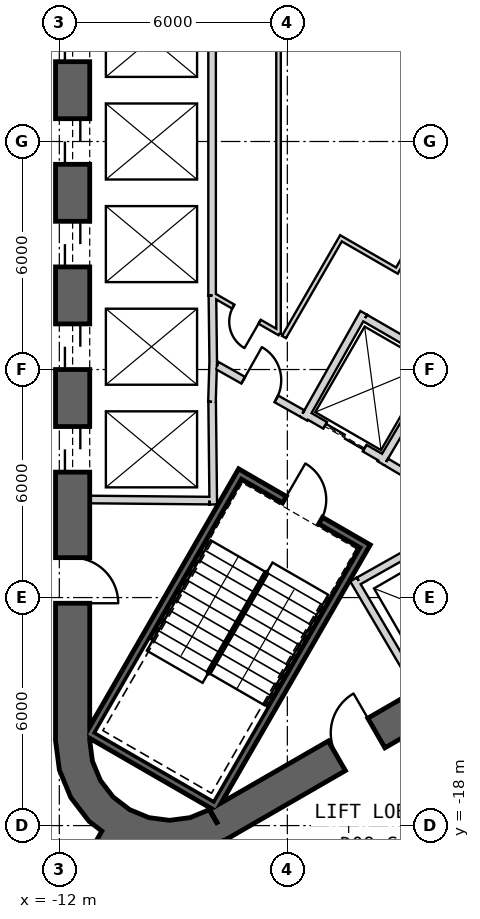
"""IFC4 building model, lengths in metres.
Left out: names, types, materials, properties, quantities, classifications, styles, units other than length and angle.
Written with IfcOpenShell. Run it as: python <this file> out.ifc"""

import sys

from ifc_helpers import new_model, si_unit, direction, frame, frame_2d, origin, place, context, subcontext, project, spatial, polyline, rectangle, outline, extrude, element, fill, save


model = new_model("IFC4")
c1 = context("Model", 3, precision=1e-05, world=origin(), true_north=direction((0.0, 1.0)))
c2 = subcontext(c1, "Body", "Model", "MODEL_VIEW")
j1 = project(units=[si_unit("LENGTHUNIT", "METRE"), si_unit("PLANEANGLEUNIT", "RADIAN")], contexts=[c1])
p1 = place(None, origin())
s1 = spatial("IfcSite", under=j1, at=p1, CompositionType="ELEMENT")
p2 = place(p1, origin())
s2 = spatial("IfcBuilding", under=s1, at=p2, CompositionType="ELEMENT")
p3 = place(p2, frame((0.0, 0.0, 181.2)))
s3 = spatial("IfcBuildingStorey", under=s2, at=p3, CompositionType="ELEMENT", Elevation=181.2)
p4 = place(p3, frame((19.475, 2.208, 0.0), z_axis=(0.0, 0.0, 1.0), x_axis=(-0.866028369851, 0.499994862586, 0.0)))
e1 = element("IfcWall", 1, at=p4, inside=s3, PredefinedType="SHEAR", context=c2, shape_type="SweptSolid", body=[
    extrude(rectangle(XDim=31.523, YDim=0.9, at=frame_2d((15.762, 0.0))), origin(), (0.0, 0.0, 1.0), 4.0),
])
p5 = place(p4, frame((7.062, 0.0, 0.0)))
e2 = element("IfcOpeningElement", 2, at=p5, cuts=e1, PredefinedType="OPENING", context=c2, shape_type="SweptSolid", body=[
    extrude(rectangle(XDim=1.2, YDim=2.4, at=frame_2d((0.6, 1.2))), frame((0.0, 0.46, 0.0), z_axis=(0.0, -1.0, 0.0), x_axis=(1.0, 0.0, 0.0)), (0.0, 0.0, 1.0), 0.92),
])
p6 = place(p4, frame((3.612, 0.0, 0.0)))
e3 = element("IfcOpeningElement", 3, at=p6, cuts=e1, PredefinedType="OPENING", context=c2, shape_type="SweptSolid", body=[
    extrude(rectangle(XDim=1.2, YDim=2.4, at=frame_2d((0.6, 1.2))), frame((0.0, 0.46, 0.0), z_axis=(0.0, -1.0, 0.0), x_axis=(1.0, 0.0, 0.0)), (0.0, 0.0, 1.0), 0.92),
])
p7 = place(p4, frame((26.712, 0.0, 0.0)))
e4 = element("IfcOpeningElement", 4, at=p7, cuts=e1, PredefinedType="OPENING", context=c2, shape_type="SweptSolid", body=[
    extrude(rectangle(XDim=1.2, YDim=2.4, at=frame_2d((0.6, 1.2))), frame((0.0, 0.46, 0.0), z_axis=(0.0, -1.0, 0.0), x_axis=(1.0, 0.0, 0.0)), (0.0, 0.0, 1.0), 0.92),
])
p8 = place(p3, frame((-11.65, 15.762, 0.0), z_axis=(0.0, 0.0, 1.0), x_axis=(0.0, -1.0, 0.0)))
e5 = element("IfcWall", 5, at=p8, inside=s3, PredefinedType="SHEAR", context=c2, shape_type="SweptSolid", body=[
    extrude(rectangle(XDim=31.523, YDim=0.9, at=frame_2d((15.762, 0.0))), origin(), (0.0, 0.0, 1.0), 4.0),
])
p9 = place(p8, frame((7.062, 0.0, 0.0)))
e6 = element("IfcOpeningElement", 6, at=p9, cuts=e5, PredefinedType="OPENING", context=c2, shape_type="SweptSolid", body=[
    extrude(rectangle(XDim=1.2, YDim=2.4, at=frame_2d((0.6, 1.2))), frame((0.0, 0.46, 0.0), z_axis=(0.0, -1.0, 0.0), x_axis=(1.0, 0.0, 0.0)), (0.0, 0.0, 1.0), 0.92),
])
p10 = place(p8, frame((9.762, 0.0, 0.0)))
e7 = element("IfcOpeningElement", 7, at=p10, cuts=e5, PredefinedType="OPENING", context=c2, shape_type="SweptSolid", body=[
    extrude(rectangle(XDim=1.2, YDim=2.4, at=frame_2d((0.6, 1.2))), frame((0.0, 0.46, 0.0), z_axis=(0.0, -1.0, 0.0), x_axis=(1.0, 0.0, 0.0)), (0.0, 0.0, 1.0), 0.92),
])
p11 = place(p8, frame((12.462, 0.0, 0.0)))
e8 = element("IfcOpeningElement", 8, at=p11, cuts=e5, PredefinedType="OPENING", context=c2, shape_type="SweptSolid", body=[
    extrude(rectangle(XDim=1.2, YDim=2.4, at=frame_2d((0.6, 1.2))), frame((0.0, 0.46, 0.0), z_axis=(0.0, -1.0, 0.0), x_axis=(1.0, 0.0, 0.0)), (0.0, 0.0, 1.0), 0.92),
])
p12 = place(p8, frame((15.162, 0.0, 0.0)))
e9 = element("IfcOpeningElement", 9, at=p12, cuts=e5, PredefinedType="OPENING", context=c2, shape_type="SweptSolid", body=[
    extrude(rectangle(XDim=1.2, YDim=2.4, at=frame_2d((0.6, 1.2))), frame((0.0, 0.46, 0.0), z_axis=(0.0, -1.0, 0.0), x_axis=(1.0, 0.0, 0.0)), (0.0, 0.0, 1.0), 0.92),
])
p13 = place(p8, frame((17.862, 0.0, 0.0)))
e10 = element("IfcOpeningElement", 10, at=p13, cuts=e5, PredefinedType="OPENING", context=c2, shape_type="SweptSolid", body=[
    extrude(rectangle(XDim=1.2, YDim=2.4, at=frame_2d((0.6, 1.2))), frame((0.0, 0.46, 0.0), z_axis=(0.0, -1.0, 0.0), x_axis=(1.0, 0.0, 0.0)), (0.0, 0.0, 1.0), 0.92),
])
p14 = place(p8, frame((20.562, 0.0, 0.0)))
e11 = element("IfcOpeningElement", 11, at=p14, cuts=e5, PredefinedType="OPENING", context=c2, shape_type="SweptSolid", body=[
    extrude(rectangle(XDim=1.2, YDim=2.4, at=frame_2d((0.6, 1.2))), frame((0.0, 0.46, 0.0), z_axis=(0.0, -1.0, 0.0), x_axis=(1.0, 0.0, 0.0)), (0.0, 0.0, 1.0), 0.92),
])
p15 = place(p8, frame((23.262, 0.0, 0.0)))
e12 = element("IfcOpeningElement", 12, at=p15, cuts=e5, PredefinedType="OPENING", context=c2, shape_type="SweptSolid", body=[
    extrude(rectangle(XDim=1.2, YDim=2.4, at=frame_2d((0.6, 1.2))), frame((0.0, 0.46, 0.0), z_axis=(0.0, -1.0, 0.0), x_axis=(1.0, 0.0, 0.0)), (0.0, 0.0, 1.0), 0.92),
])
p16 = place(p8, frame((3.612, 0.0, 0.0)))
e13 = element("IfcOpeningElement", 13, at=p16, cuts=e5, PredefinedType="OPENING", context=c2, shape_type="SweptSolid", body=[
    extrude(rectangle(XDim=1.2, YDim=2.4, at=frame_2d((0.6, 1.2))), frame((0.0, 0.46, 0.0), z_axis=(0.0, -1.0, 0.0), x_axis=(1.0, 0.0, 0.0)), (0.0, 0.0, 1.0), 0.92),
])
p17 = place(p8, frame((26.712, 0.0, 0.0)))
e14 = element("IfcOpeningElement", 14, at=p17, cuts=e5, PredefinedType="OPENING", context=c2, shape_type="SweptSolid", body=[
    extrude(rectangle(XDim=1.2, YDim=2.4, at=frame_2d((0.6, 1.2))), frame((0.0, 0.46, 0.0), z_axis=(0.0, -1.0, 0.0), x_axis=(1.0, 0.0, 0.0)), (0.0, 0.0, 1.0), 0.92),
])
p18 = place(p3, frame((-7.825, -17.97, 0.0), z_axis=(0.0, 0.0, 1.0), x_axis=(0.866028369851, 0.499994862586, 0.0)))
e15 = element("IfcWall", 15, at=p18, inside=s3, PredefinedType="SHEAR", context=c2, shape_type="SweptSolid", body=[
    extrude(rectangle(XDim=31.523, YDim=0.9, at=frame_2d((15.762, 0.0))), origin(), (0.0, 0.0, 1.0), 4.0),
])
p19 = place(p18, frame((7.062, 0.0, 0.0)))
e16 = element("IfcOpeningElement", 16, at=p19, cuts=e15, PredefinedType="OPENING", context=c2, shape_type="SweptSolid", body=[
    extrude(rectangle(XDim=1.2, YDim=2.4, at=frame_2d((0.6, 1.2))), frame((0.0, 0.46, 0.0), z_axis=(0.0, -1.0, 0.0), x_axis=(1.0, 0.0, 0.0)), (0.0, 0.0, 1.0), 0.92),
])
p20 = place(p18, frame((9.762, 0.0, 0.0)))
e17 = element("IfcOpeningElement", 17, at=p20, cuts=e15, PredefinedType="OPENING", context=c2, shape_type="SweptSolid", body=[
    extrude(rectangle(XDim=1.2, YDim=2.4, at=frame_2d((0.6, 1.2))), frame((0.0, 0.46, 0.0), z_axis=(0.0, -1.0, 0.0), x_axis=(1.0, 0.0, 0.0)), (0.0, 0.0, 1.0), 0.92),
])
p21 = place(p18, frame((12.462, 0.0, 0.0)))
e18 = element("IfcOpeningElement", 18, at=p21, cuts=e15, PredefinedType="OPENING", context=c2, shape_type="SweptSolid", body=[
    extrude(rectangle(XDim=1.2, YDim=2.4, at=frame_2d((0.6, 1.2))), frame((0.0, 0.46, 0.0), z_axis=(0.0, -1.0, 0.0), x_axis=(1.0, 0.0, 0.0)), (0.0, 0.0, 1.0), 0.92),
])
p22 = place(p18, frame((15.162, 0.0, 0.0)))
e19 = element("IfcOpeningElement", 19, at=p22, cuts=e15, PredefinedType="OPENING", context=c2, shape_type="SweptSolid", body=[
    extrude(rectangle(XDim=1.2, YDim=2.4, at=frame_2d((0.6, 1.2))), frame((0.0, 0.46, 0.0), z_axis=(0.0, -1.0, 0.0), x_axis=(1.0, 0.0, 0.0)), (0.0, 0.0, 1.0), 0.92),
])
p23 = place(p18, frame((17.862, 0.0, 0.0)))
e20 = element("IfcOpeningElement", 20, at=p23, cuts=e15, PredefinedType="OPENING", context=c2, shape_type="SweptSolid", body=[
    extrude(rectangle(XDim=1.2, YDim=2.4, at=frame_2d((0.6, 1.2))), frame((0.0, 0.46, 0.0), z_axis=(0.0, -1.0, 0.0), x_axis=(1.0, 0.0, 0.0)), (0.0, 0.0, 1.0), 0.92),
])
p24 = place(p18, frame((20.562, 0.0, 0.0)))
e21 = element("IfcOpeningElement", 21, at=p24, cuts=e15, PredefinedType="OPENING", context=c2, shape_type="SweptSolid", body=[
    extrude(rectangle(XDim=1.2, YDim=2.4, at=frame_2d((0.6, 1.2))), frame((0.0, 0.46, 0.0), z_axis=(0.0, -1.0, 0.0), x_axis=(1.0, 0.0, 0.0)), (0.0, 0.0, 1.0), 0.92),
])
p25 = place(p18, frame((26.712, 0.0, 0.0)))
e22 = element("IfcOpeningElement", 22, at=p25, cuts=e15, PredefinedType="OPENING", context=c2, shape_type="SweptSolid", body=[
    extrude(rectangle(XDim=1.2, YDim=2.4, at=frame_2d((0.6, 1.2))), frame((0.0, 0.46, 0.0), z_axis=(0.0, -1.0, 0.0), x_axis=(1.0, 0.0, 0.0)), (0.0, 0.0, 1.0), 0.92),
])
p26 = place(p18, frame((3.612, 0.0, 0.0)))
e23 = element("IfcOpeningElement", 23, at=p26, cuts=e15, PredefinedType="OPENING", context=c2, shape_type="SweptSolid", body=[
    extrude(rectangle(XDim=1.2, YDim=2.4, at=frame_2d((0.6, 1.2))), frame((0.0, 0.46, 0.0), z_axis=(0.0, -1.0, 0.0), x_axis=(1.0, 0.0, 0.0)), (0.0, 0.0, 1.0), 0.92),
])
p27 = place(p3, origin())
e24 = element("IfcWall", 24, at=p27, inside=s3, PredefinedType="SHEAR", context=c2, shape_type="SweptSolid", body=[
    extrude(outline(polyline([(-12.1, -15.762), (-11.998, -16.538), (-11.698, -17.262), (-11.221, -17.883), (-10.6, -18.36), (-9.876, -18.659), (-9.1, -18.762), (-8.323, -18.659), (-7.6, -18.36), (-8.05, -17.58), (-8.556, -17.79), (-9.1, -17.862), (-9.644, -17.79), (-10.15, -17.58), (-10.585, -17.247), (-10.919, -16.812), (-11.128, -16.305), (-11.2, -15.762), (-12.1, -15.762)])), origin(), (0.0, 0.0, 1.0), 4.0),
])
p28 = place(p3, frame((-10.575, -18.316, 0.0), z_axis=(0.0, 0.0, 1.0), x_axis=(-0.500002625756, -0.866023887798, 0.0)))
e25 = element("IfcWall", 25, at=p28, inside=s3, PredefinedType="SHEAR", context=c2, shape_type="SweptSolid", body=[
    extrude(rectangle(XDim=12.22, YDim=0.7, at=frame_2d((6.11, 0.0))), origin(), (0.0, 0.0, 1.0), 4.0),
])
p29 = place(p3, frame((-7.98, 4.05, 0.0), z_axis=(0.0, 0.0, 1.0), x_axis=(0.0, -1.0, 0.0)))
e26 = element("IfcWall", 26, at=p29, inside=s3, PredefinedType="PLUMBINGWALL", context=c2, shape_type="SweptSolid", body=[
    extrude(rectangle(XDim=8.1, YDim=0.2, at=frame_2d((4.05, 0.0))), origin(), (0.0, 0.0, 1.0), 3.7),
])
p30 = place(p3, frame((-7.95, -5.772, 0.0), z_axis=(0.0, 0.0, 1.0), x_axis=(-0.030803413295, -0.999525462272, 0.0)))
e27 = element("IfcWall", 27, at=p30, inside=s3, PredefinedType="PLUMBINGWALL", context=c2, shape_type="SweptSolid", body=[
    extrude(rectangle(XDim=1.078, YDim=0.2, at=frame_2d((0.539, 0.0))), origin(), (0.0, 0.0, 1.0), 3.7),
])
p31 = place(p3, frame((-7.971, -4.05, 0.0), z_axis=(0.0, 0.0, 1.0), x_axis=(0.012042535896, -0.999927486035, 0.0)))
e28 = element("IfcWall", 28, at=p31, inside=s3, PredefinedType="PLUMBINGWALL", context=c2, shape_type="SweptSolid", body=[
    extrude(rectangle(XDim=1.845, YDim=0.2, at=frame_2d((0.922, 0.0))), origin(), (0.0, 0.0, 1.0), 3.7),
])
p32 = place(p3, frame((-7.979, -6.85, 0.0), z_axis=(0.0, 0.0, 1.0), x_axis=(0.011121475088, -0.999938154483, 0.0)))
e29 = element("IfcWall", 29, at=p32, inside=s3, PredefinedType="PLUMBINGWALL", context=c2, shape_type="SweptSolid", body=[
    extrude(rectangle(XDim=2.7, YDim=0.2, at=frame_2d((1.35, 0.0))), origin(), (0.0, 0.0, 1.0), 3.7),
])
p33 = place(p3, frame((-8.05, -9.449, 0.0), z_axis=(0.0, 0.0, 1.0), x_axis=(-0.999957467379, 0.009222983926, 0.0)))
e30 = element("IfcWall", 30, at=p33, inside=s3, PredefinedType="PLUMBINGWALL", context=c2, shape_type="SweptSolid", body=[
    extrude(rectangle(XDim=3.15, YDim=0.2, at=frame_2d((1.575, 0.0))), origin(), (0.0, 0.0, 1.0), 3.7),
])
p34 = place(p3, frame((-2.558, -14.409, 0.0), z_axis=(0.0, 0.0, 1.0), x_axis=(-0.507997497166, 0.861358544901, 0.0)))
e31 = element("IfcWall", 31, at=p34, inside=s3, PredefinedType="PLUMBINGWALL", context=c2, shape_type="SweptSolid", body=[
    extrude(rectangle(XDim=3.35, YDim=0.2, at=frame_2d((1.675, 0.0))), origin(), (0.0, 0.0, 1.0), 3.7),
])
p35 = place(p3, frame((-1.769, -10.237, 0.0), z_axis=(0.0, 0.0, 1.0), x_axis=(-0.871534483978, -0.490334215854, 0.0)))
e32 = element("IfcWall", 32, at=p35, inside=s3, PredefinedType="PLUMBINGWALL", context=c2, shape_type="SweptSolid", body=[
    extrude(rectangle(XDim=2.7, YDim=0.2, at=frame_2d((1.35, 0.0))), origin(), (0.0, 0.0, 1.0), 3.7),
])
p36 = place(p3, frame((-3.905, -10.563, -0.3), z_axis=(0.0, 0.0, 1.0), x_axis=(-0.500012932018, -0.866017937352, 0.0)))
e33 = element("IfcWall", 33, at=p36, inside=s3, PredefinedType="SHEAR", context=c2, shape_type="SweptSolid", body=[
    extrude(rectangle(XDim=8.1, YDim=0.2, at=frame_2d((4.05, 0.0))), origin(), (0.0, 0.0, 1.0), 4.0),
])
p37 = place(p3, frame((-11.282, -15.541, -0.3), z_axis=(0.0, 0.0, 1.0), x_axis=(0.866000483506, -0.500043160704, 0.0)))
e34 = element("IfcWall", 34, at=p37, inside=s3, PredefinedType="SHEAR", context=c2, shape_type="SweptSolid", body=[
    extrude(rectangle(XDim=3.8, YDim=0.2, at=frame_2d((1.9, 0.0))), origin(), (0.0, 0.0, 1.0), 4.0),
])
p38 = place(p3, frame((-7.196, -8.663, -0.3), z_axis=(0.0, 0.0, 1.0), x_axis=(-0.499997992926, -0.866026562566, 0.0)))
e35 = element("IfcWall", 35, at=p38, inside=s3, PredefinedType="SHEAR", context=c2, shape_type="SweptSolid", body=[
    extrude(rectangle(XDim=7.9, YDim=0.2, at=frame_2d((3.95, 0.0))), origin(), (0.0, 0.0, 1.0), 4.0),
])
p39 = place(p3, frame((-4.041, -10.599, -0.3), z_axis=(0.0, 0.0, 1.0), x_axis=(-0.866047807691, 0.499961193289, 0.0)))
e36 = element("IfcWall", 36, at=p39, inside=s3, PredefinedType="SHEAR", context=c2, shape_type="SweptSolid", body=[
    extrude(rectangle(XDim=3.6, YDim=0.2, at=frame_2d((1.8, 0.0))), origin(), (0.0, 0.0, 1.0), 4.0),
])
p40 = place(p39, frame((1.25, 0.0, 0.3)))
e37 = element("IfcOpeningElement", 37, at=p40, cuts=e36, PredefinedType="OPENING", context=c2, shape_type="SweptSolid", body=[
    extrude(rectangle(XDim=1.1, YDim=2.1, at=frame_2d((0.55, 1.05))), frame((0.0, 0.11, 0.0), z_axis=(0.0, -1.0, 0.0), x_axis=(1.0, 0.0, 0.0)), (0.0, 0.0, 1.0), 0.22),
])
p41 = place(p3, frame((-3.446, -8.368, 0.0), z_axis=(0.0, 0.0, 1.0), x_axis=(-0.866024647952, 0.500001309137, 0.0)))
e38 = element("IfcWall", 38, at=p41, inside=s3, PredefinedType="PLUMBINGWALL", context=c2, shape_type="SweptSolid", body=[
    extrude(rectangle(XDim=2.4, YDim=0.2, at=frame_2d((1.2, 0.0))), origin(), (0.0, 0.0, 1.0), 3.7),
])
p42 = place(p41, frame((0.6, 0.0, 0.0)))
e39 = element("IfcOpeningElement", 39, at=p42, cuts=e38, PredefinedType="OPENING", context=c2, shape_type="SweptSolid", body=[
    extrude(rectangle(XDim=1.2, YDim=2.4, at=frame_2d((0.6, 1.2))), frame((0.0, 0.11, 0.0), z_axis=(0.0, -1.0, 0.0), x_axis=(1.0, 0.0, 0.0)), (0.0, 0.0, 1.0), 0.22),
])
p43 = place(p3, frame((-1.961, -5.796, 0.0), z_axis=(0.0, 0.0, 1.0), x_axis=(-0.508647062354, -0.860975125052, 0.0)))
e40 = element("IfcWall", 40, at=p43, inside=s3, PredefinedType="PLUMBINGWALL", context=c2, shape_type="SweptSolid", body=[
    extrude(rectangle(XDim=3.1, YDim=0.2, at=frame_2d((1.55, 0.0))), origin(), (0.0, 0.0, 1.0), 3.7),
])
p44 = place(p3, frame((-3.99, -4.509, 0.0), z_axis=(0.0, 0.0, 1.0), x_axis=(-0.491358283181, -0.870957540612, 0.0)))
e41 = element("IfcWall", 41, at=p44, inside=s3, PredefinedType="PLUMBINGWALL", context=c2, shape_type="SweptSolid", body=[
    extrude(rectangle(XDim=3.2, YDim=0.2, at=frame_2d((1.6, 0.0))), origin(), (0.0, 0.0, 1.0), 3.7),
])
p45 = place(p3, frame((-3.953, -4.646, 0.0), z_axis=(0.0, 0.0, 1.0), x_axis=(0.866038900241, -0.499976622722, 0.0)))
e42 = element("IfcWall", 42, at=p45, inside=s3, PredefinedType="PLUMBINGWALL", context=c2, shape_type="SweptSolid", body=[
    extrude(rectangle(XDim=2.189, YDim=0.2, at=frame_2d((1.095, 0.0))), origin(), (0.0, 0.0, 1.0), 3.7),
])
p46 = place(p3, frame((-3.401, -8.43, 0.0), z_axis=(0.0, 0.0, 1.0), x_axis=(0.860615607571, -0.509255118781, 0.0)))
e43 = element("IfcWall", 43, at=p46, inside=s3, PredefinedType="PARTITIONING", context=c2, shape_type="SweptSolid", body=[
    extrude(rectangle(XDim=2.581, YDim=0.2, at=frame_2d((1.29, 0.0))), origin(), (0.0, 0.0, 1.0), 3.7),
])
p47 = place(p3, frame((-7.849, -5.894, 0.0), z_axis=(0.0, 0.0, 1.0), x_axis=(0.871363259478, -0.490638431059, 0.0)))
e44 = element("IfcWall", 44, at=p47, inside=s3, PredefinedType="PARTITIONING", context=c2, shape_type="SweptSolid", body=[
    extrude(rectangle(XDim=2.581, YDim=0.2, at=frame_2d((1.291, 0.0))), origin(), (0.0, 0.0, 1.0), 3.7),
])
p48 = place(p47, frame((0.791, 0.0, 0.0)))
e45 = element("IfcOpeningElement", 45, at=p48, cuts=e44, PredefinedType="OPENING", context=c2, shape_type="SweptSolid", body=[
    extrude(rectangle(XDim=1.0, YDim=2.1, at=frame_2d((0.5, 1.05))), frame((0.0, 0.11, 0.0), z_axis=(0.0, -1.0, 0.0), x_axis=(1.0, 0.0, 0.0)), (0.0, 0.0, 1.0), 0.22),
])
p49 = place(p3, frame((-6.231, 5.062, 0.0), z_axis=(0.0, 0.0, 1.0), x_axis=(0.0, -1.0, 0.0)))
e46 = element("IfcWall", 46, at=p49, inside=s3, PredefinedType="PARTITIONING", context=c2, shape_type="SweptSolid", body=[
    extrude(rectangle(XDim=10.125, YDim=0.12, at=frame_2d((5.062, 0.0))), origin(), (0.0, 0.0, 1.0), 3.7),
])
p50 = place(p3, frame((-7.95, -4.041, 0.0), z_axis=(0.0, 0.0, 1.0), x_axis=(0.867071050325, -0.498184497639, 0.0)))
e47 = element("IfcWall", 47, at=p50, inside=s3, PredefinedType="PARTITIONING", context=c2, shape_type="SweptSolid", body=[
    extrude(rectangle(XDim=2.017, YDim=0.12, at=frame_2d((1.008, 0.0))), origin(), (0.0, 0.0, 1.0), 3.7),
])
p51 = place(p50, frame((0.608, 0.0, 0.0)))
e48 = element("IfcOpeningElement", 48, at=p51, cuts=e47, PredefinedType="OPENING", context=c2, shape_type="SweptSolid", body=[
    extrude(rectangle(XDim=0.8, YDim=2.1, at=frame_2d((0.4, 1.05))), frame((0.0, 0.07, 0.0), z_axis=(0.0, -1.0, 0.0), x_axis=(1.0, 0.0, 0.0)), (0.0, 0.0, 1.0), 0.14),
])
p52 = place(p3, frame((-2.07, 1.585, 0.0), z_axis=(0.0, 0.0, 1.0), x_axis=(-0.499937346687, 0.86606157367, 0.0)))
e49 = element("IfcWall", 49, at=p52, inside=s3, PredefinedType="PARTITIONING", context=c2, shape_type="SweptSolid", body=[
    extrude(rectangle(XDim=2.032, YDim=0.12, at=frame_2d((1.016, 0.0))), origin(), (0.0, 0.0, 1.0), 3.7),
])
p53 = place(p3, frame((-3.146, -3.449, 0.0), z_axis=(0.0, 0.0, 1.0), x_axis=(0.500007041985, 0.866021338054, 0.0)))
e50 = element("IfcWall", 50, at=p53, inside=s3, PredefinedType="PARTITIONING", context=c2, shape_type="SweptSolid", body=[
    extrude(rectangle(XDim=2.03, YDim=0.12, at=frame_2d((1.015, 0.0))), origin(), (0.0, 0.0, 1.0), 3.7),
])
p54 = place(p3, frame((-4.64, -2.517, 0.0), z_axis=(0.0, 0.0, 1.0), x_axis=(0.865989465428, -0.500062241894, 0.0)))
e51 = element("IfcWall", 51, at=p54, inside=s3, PredefinedType="PARTITIONING", context=c2, shape_type="SweptSolid", body=[
    extrude(rectangle(XDim=1.7, YDim=0.12, at=frame_2d((0.85, 0.0))), origin(), (0.0, 0.0, 1.0), 3.7),
])
p55 = place(p3, frame((-6.088, -5.145, 0.0), z_axis=(0.0, 0.0, 1.0), x_axis=(0.500050696077, 0.865996132412, 0.0)))
e52 = element("IfcWall", 52, at=p55, inside=s3, PredefinedType="PARTITIONING", context=c2, shape_type="SweptSolid", body=[
    extrude(rectangle(XDim=2.94, YDim=0.12, at=frame_2d((1.47, 0.0))), origin(), (0.0, 0.0, 1.0), 3.7),
])
p56 = place(p40, origin())
e53 = element("IfcDoor", 53, at=p56, inside=s3, OperationType="SINGLE_SWING_LEFT", PredefinedType="USERDEFINED", context=c2, shape_type="SweptSolid", body=[
    extrude(rectangle(XDim=1.1, YDim=2.1, at=frame_2d((0.55, 1.05))), frame((0.0, 0.025, 0.0), z_axis=(0.0, -1.0, 0.0), x_axis=(1.0, 0.0, 0.0)), (0.0, 0.0, 1.0), 0.05),
])
fill(e37, e53)
p57 = place(p48, origin())
e54 = element("IfcDoor", 54, at=p57, inside=s3, OperationType="SINGLE_SWING_RIGHT", PredefinedType="USERDEFINED", context=c2, shape_type="SweptSolid", body=[
    extrude(rectangle(XDim=1.0, YDim=2.1, at=frame_2d((0.5, 1.05))), frame((0.0, 0.025, 0.0), z_axis=(0.0, -1.0, 0.0), x_axis=(1.0, 0.0, 0.0)), (0.0, 0.0, 1.0), 0.05),
])
fill(e45, e54)
p58 = place(p42, origin())
e55 = element("IfcDoor", 55, at=p58, inside=s3, OperationType="SLIDING_TO_LEFT", PredefinedType="USERDEFINED", context=c2, shape_type="SweptSolid", body=[
    extrude(rectangle(XDim=1.2, YDim=2.4, at=frame_2d((0.6, 1.2))), frame((0.0, 0.025, 0.0), z_axis=(0.0, -1.0, 0.0), x_axis=(1.0, 0.0, 0.0)), (0.0, 0.0, 1.0), 0.05),
])
fill(e39, e55)
p59 = place(p51, origin())
e56 = element("IfcDoor", 56, at=p59, inside=s3, OperationType="SINGLE_SWING_RIGHT", PredefinedType="USERDEFINED", context=c2, shape_type="SweptSolid", body=[
    extrude(rectangle(XDim=0.8, YDim=2.1, at=frame_2d((0.4, 1.05))), frame((0.0, 0.025, 0.0), z_axis=(0.0, -1.0, 0.0), x_axis=(1.0, 0.0, 0.0)), (0.0, 0.0, 1.0), 0.05),
])
fill(e48, e56)
p60 = place(p11, origin())
e57 = element("IfcDoor", 57, at=p60, inside=s3, OperationType="SLIDING_TO_LEFT", PredefinedType="USERDEFINED", context=c2, shape_type="SweptSolid", body=[
    extrude(rectangle(XDim=1.2, YDim=2.4, at=frame_2d((0.6, 1.2))), frame((0.0, 0.025, 0.0), z_axis=(0.0, -1.0, 0.0), x_axis=(1.0, 0.0, 0.0)), (0.0, 0.0, 1.0), 0.05),
])
fill(e8, e57)
p61 = place(p12, origin())
e58 = element("IfcDoor", 58, at=p61, inside=s3, OperationType="SLIDING_TO_LEFT", PredefinedType="USERDEFINED", context=c2, shape_type="SweptSolid", body=[
    extrude(rectangle(XDim=1.2, YDim=2.4, at=frame_2d((0.6, 1.2))), frame((0.0, 0.025, 0.0), z_axis=(0.0, -1.0, 0.0), x_axis=(1.0, 0.0, 0.0)), (0.0, 0.0, 1.0), 0.05),
])
fill(e9, e58)
p62 = place(p13, origin())
e59 = element("IfcDoor", 59, at=p62, inside=s3, OperationType="SLIDING_TO_LEFT", PredefinedType="USERDEFINED", context=c2, shape_type="SweptSolid", body=[
    extrude(rectangle(XDim=1.2, YDim=2.4, at=frame_2d((0.6, 1.2))), frame((0.0, 0.025, 0.0), z_axis=(0.0, -1.0, 0.0), x_axis=(1.0, 0.0, 0.0)), (0.0, 0.0, 1.0), 0.05),
])
fill(e10, e59)
p63 = place(p14, origin())
e60 = element("IfcDoor", 60, at=p63, inside=s3, OperationType="SLIDING_TO_LEFT", PredefinedType="USERDEFINED", context=c2, shape_type="SweptSolid", body=[
    extrude(rectangle(XDim=1.2, YDim=2.4, at=frame_2d((0.6, 1.2))), frame((0.0, 0.025, 0.0), z_axis=(0.0, -1.0, 0.0), x_axis=(1.0, 0.0, 0.0)), (0.0, 0.0, 1.0), 0.05),
])
fill(e11, e60)
p64 = place(p15, origin())
e61 = element("IfcDoor", 61, at=p64, inside=s3, OperationType="SLIDING_TO_LEFT", PredefinedType="USERDEFINED", context=c2, shape_type="SweptSolid", body=[
    extrude(rectangle(XDim=1.2, YDim=2.4, at=frame_2d((0.6, 1.2))), frame((0.0, 0.025, 0.0), z_axis=(0.0, -1.0, 0.0), x_axis=(1.0, 0.0, 0.0)), (0.0, 0.0, 1.0), 0.05),
])
fill(e12, e61)
p65 = place(p17, origin())
e62 = element("IfcDoor", 62, at=p65, inside=s3, OperationType="SINGLE_SWING_LEFT", PredefinedType="USERDEFINED", context=c2, shape_type="SweptSolid", body=[
    extrude(rectangle(XDim=1.2, YDim=2.4, at=frame_2d((0.6, 1.2))), frame((0.0, 0.025, 0.0), z_axis=(0.0, -1.0, 0.0), x_axis=(1.0, 0.0, 0.0)), (0.0, 0.0, 1.0), 0.05),
])
fill(e14, e62)
p66 = place(p26, origin())
e63 = element("IfcDoor", 63, at=p66, inside=s3, OperationType="SINGLE_SWING_LEFT", PredefinedType="USERDEFINED", context=c2, shape_type="SweptSolid", body=[
    extrude(rectangle(XDim=1.2, YDim=2.4, at=frame_2d((0.6, 1.2))), frame((0.0, 0.025, 0.0), z_axis=(0.0, -1.0, 0.0), x_axis=(1.0, 0.0, 0.0)), (0.0, 0.0, 1.0), 0.05),
])
fill(e23, e63)
save(model, sys.argv[1])
